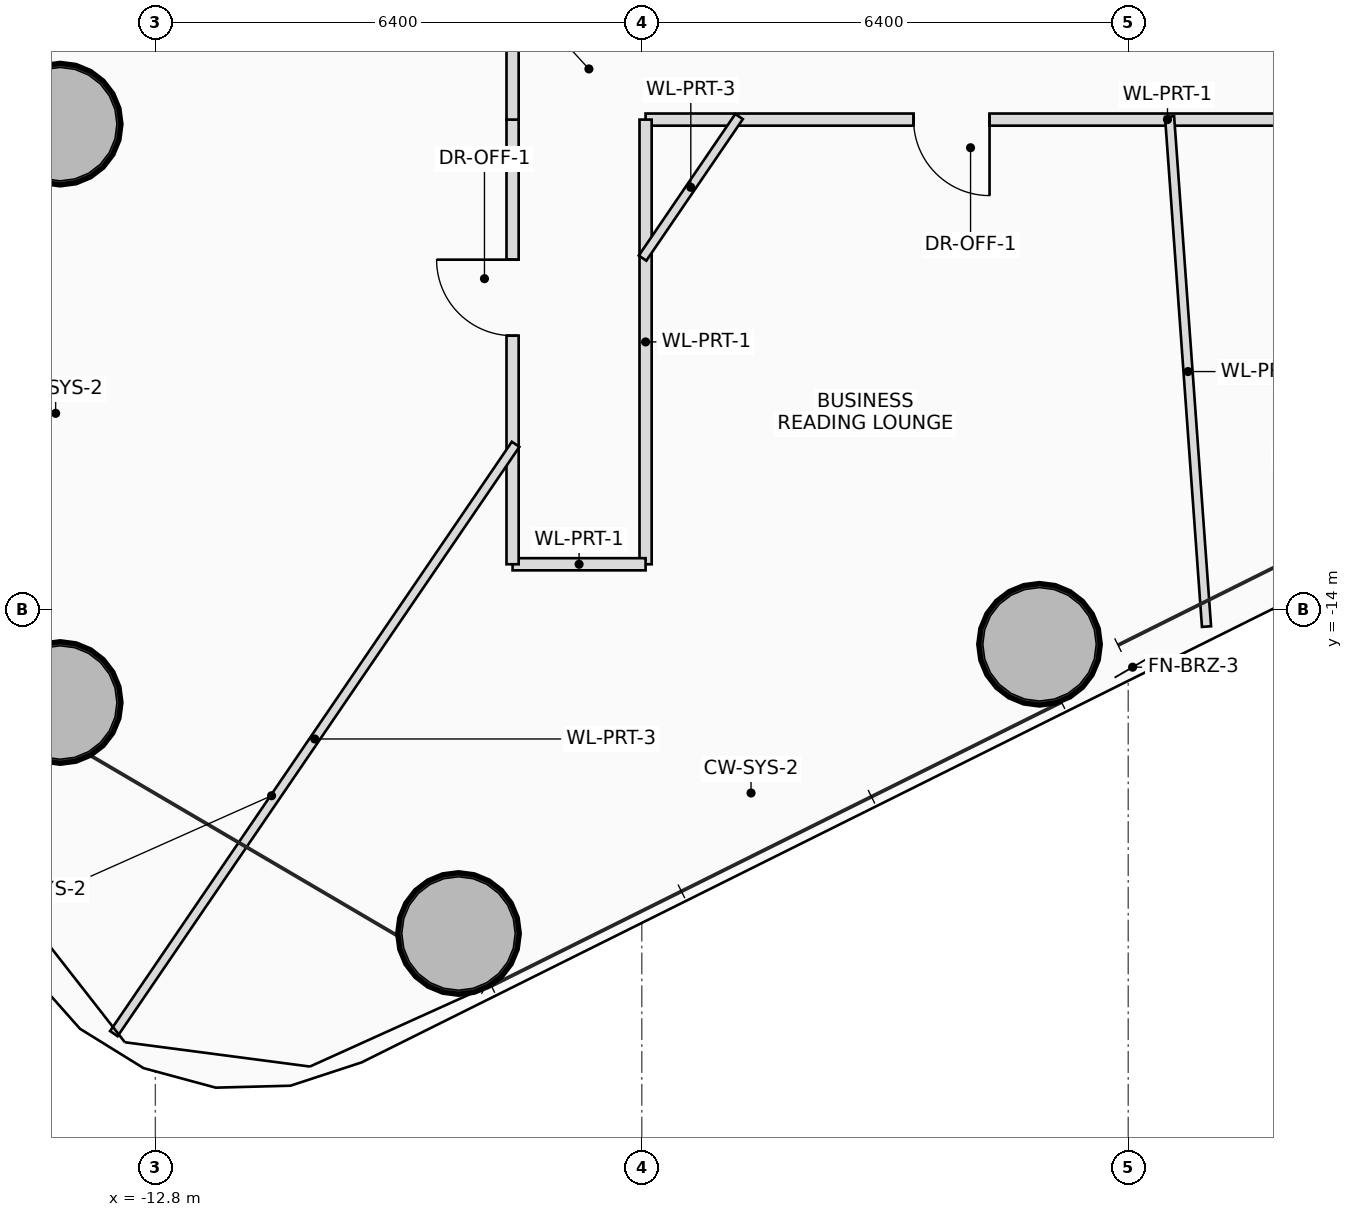
"""IFC4 building model, lengths in metres.
Left out: names, types, materials, properties, quantities, classifications, styles, units other than length and angle.
Written with IfcOpenShell. Run it as: python <this file> out.ifc"""

import sys

from ifc_helpers import new_model, si_unit, direction, frame, frame_2d, origin, origin_2d, place, context, subcontext, project, spatial, rectangle, hollow_circle, extrude, source, transform, mapped, element, fill, save


model = new_model("IFC4")
c1 = context("Model", 3, precision=1e-05, world=origin(), true_north=direction((0.0, 1.0)))
c2 = subcontext(c1, "Body", "Model", "MODEL_VIEW")
j1 = project(units=[si_unit("LENGTHUNIT", "METRE"), si_unit("PLANEANGLEUNIT", "RADIAN")], contexts=[c1])
p1 = place(None, origin())
s1 = spatial("IfcSite", under=j1, at=p1, CompositionType="ELEMENT")
p2 = place(p1, origin())
s2 = spatial("IfcBuilding", under=s1, at=p2, CompositionType="ELEMENT")
p3 = place(p2, frame((0.0, 0.0, 38.6)))
s3 = spatial("IfcBuildingStorey", under=s2, at=p3, CompositionType="ELEMENT", Elevation=38.6)
m1 = source(origin(), c2, "Body", "SweptSolid", [
    extrude(hollow_circle(Radius=0.8, WallThickness=0.055, at=origin_2d()), origin(), (0.0, 0.0, 1.0), 3.7),
])
for number, where, z_axis, x_axis in (
    (1, (-8.812, -18.258, 0.0), (0.0, 0.0, 1.0), (1.0, 0.0, 0.0)),
    (2, (-1.167, -14.453, 0.0), (0.0, 0.0, 1.0), (1.0, 0.0, 0.0)),
    (3, (-14.052, -7.61, 0.0), (0.0, 0.0, 1.0), (1.0, 0.0, 0.0)),
    (4, (-14.052, -15.219, 0.0), (0.0, 0.0, 1.0), (1.0, 0.0, 0.0)),
):
    element("IfcColumn", number, at=place(p3, frame(where, z_axis=z_axis, x_axis=x_axis)), inside=s3, PredefinedType="COLUMN", context=c2, shape_type="MappedRepresentation", body=[
        mapped(m1, transform((0.0, 0.0, 0.0), scale=1.0)),
    ])
p4 = place(p3, frame((6.35, -7.55, 0.0), z_axis=(0.0, 0.0, 1.0), x_axis=(-1.0, 0.0, 0.0)))
e5 = element("IfcWall", 5, at=p4, inside=s3, PredefinedType="PARTITIONING", context=c2, shape_type="SweptSolid", body=[
    extrude(rectangle(XDim=12.7, YDim=0.16, at=frame_2d((6.35, 0.0))), origin(), (0.0, 0.0, 1.0), 2.8),
])
p5 = place(p4, frame((2.493, 0.0, 0.0)))
e6 = element("IfcOpeningElement", 6, at=p5, cuts=e5, PredefinedType="OPENING", context=c2, shape_type="SweptSolid", body=[
    extrude(rectangle(XDim=1.0, YDim=2.25, at=frame_2d((0.5, 1.125))), frame((0.0, 0.09, 0.0), z_axis=(0.0, -1.0, 0.0), x_axis=(1.0, 0.0, 0.0)), (0.0, 0.0, 1.0), 0.18),
])
p6 = place(p4, frame((8.175, 0.0, 0.0)))
e7 = element("IfcOpeningElement", 7, at=p6, cuts=e5, PredefinedType="OPENING", context=c2, shape_type="SweptSolid", body=[
    extrude(rectangle(XDim=1.0, YDim=2.25, at=frame_2d((0.5, 1.125))), frame((0.0, 0.09, 0.0), z_axis=(0.0, -1.0, 0.0), x_axis=(1.0, 0.0, 0.0)), (0.0, 0.0, 1.0), 0.18),
])
p7 = place(p3, frame((-6.35, -7.55, 0.0), z_axis=(0.0, 0.0, 1.0), x_axis=(0.0, -1.0, 0.0)))
e8 = element("IfcWall", 8, at=p7, inside=s3, PredefinedType="PARTITIONING", context=c2, shape_type="SweptSolid", body=[
    extrude(rectangle(XDim=5.85, YDim=0.16, at=frame_2d((2.925, 0.0))), origin(), (0.0, 0.0, 1.0), 2.8),
])
p8 = place(p3, frame((-6.35, -13.4, 0.0), z_axis=(0.0, 0.0, 1.0), x_axis=(-1.0, 0.0, 0.0)))
e9 = element("IfcWall", 9, at=p8, inside=s3, PredefinedType="PARTITIONING", context=c2, shape_type="SweptSolid", body=[
    extrude(rectangle(XDim=1.75, YDim=0.16, at=frame_2d((0.875, 0.0))), origin(), (0.0, 0.0, 1.0), 2.8),
])
p9 = place(p3, frame((-8.1, -13.4, 0.0), z_axis=(0.0, 0.0, 1.0), x_axis=(0.0, 1.0, 0.0)))
e10 = element("IfcWall", 10, at=p9, inside=s3, PredefinedType="PARTITIONING", context=c2, shape_type="SweptSolid", body=[
    extrude(rectangle(XDim=5.85, YDim=0.16, at=frame_2d((2.925, 0.0))), origin(), (0.0, 0.0, 1.0), 2.8),
])
p10 = place(p9, frame((3.007, 0.0, 0.0)))
e11 = element("IfcOpeningElement", 11, at=p10, cuts=e10, PredefinedType="OPENING", context=c2, shape_type="SweptSolid", body=[
    extrude(rectangle(XDim=1.0, YDim=2.25, at=frame_2d((0.5, 1.125))), frame((0.0, 0.09, 0.0), z_axis=(0.0, -1.0, 0.0), x_axis=(1.0, 0.0, 0.0)), (0.0, 0.0, 1.0), 0.18),
])
p11 = place(p3, frame((-8.1, -7.55, 0.0), z_axis=(0.0, 0.0, 1.0), x_axis=(0.0, 1.0, 0.0)))
e12 = element("IfcWall", 12, at=p11, inside=s3, PredefinedType="PARTITIONING", context=c2, shape_type="SweptSolid", body=[
    extrude(rectangle(XDim=15.1, YDim=0.16, at=frame_2d((7.55, 0.0))), origin(), (0.0, 0.0, 1.0), 2.8),
])
p12 = place(p11, frame((11.285, 0.0, 0.0)))
e13 = element("IfcOpeningElement", 13, at=p12, cuts=e12, PredefinedType="OPENING", context=c2, shape_type="SweptSolid", body=[
    extrude(rectangle(XDim=1.0, YDim=2.25, at=frame_2d((0.5, 1.125))), frame((0.0, 0.09, 0.0), z_axis=(0.0, -1.0, 0.0), x_axis=(1.0, 0.0, 0.0)), (0.0, 0.0, 1.0), 0.18),
])
p13 = place(p3, frame((-5.12, -7.51, 0.0), z_axis=(0.0, 0.0, 1.0), x_axis=(-0.563343546536, -0.826222759657, 0.0)))
e14 = element("IfcWall", 14, at=p13, inside=s3, PredefinedType="PARTITIONING", context=c2, shape_type="SweptSolid", body=[
    extrude(rectangle(XDim=2.254, YDim=0.12, at=frame_2d((1.127, 0.0))), origin(), (0.0, 0.0, 1.0), 3.16),
])
p14 = place(p3, frame((-8.06, -11.822, 0.0), z_axis=(0.0, 0.0, 1.0), x_axis=(-0.56331583488, -0.826241653618, 0.0)))
e15 = element("IfcWall", 15, at=p14, inside=s3, PredefinedType="PARTITIONING", context=c2, shape_type="SweptSolid", body=[
    extrude(rectangle(XDim=9.384, YDim=0.12, at=frame_2d((4.692, 0.0))), origin(), (0.0, 0.0, 1.0), 2.96),
])
p15 = place(p3, frame((0.544, -7.51, 0.0), z_axis=(0.0, 0.0, 1.0), x_axis=(0.072255425025, -0.997386160699, 0.0)))
e16 = element("IfcWall", 16, at=p15, inside=s3, PredefinedType="PARTITIONING", context=c2, shape_type="SweptSolid", body=[
    extrude(rectangle(XDim=6.727, YDim=0.12, at=frame_2d((3.364, 0.0))), origin(), (0.0, 0.0, 1.0), 2.96),
])
p16 = place(p6, origin())
e17 = element("IfcDoor", 17, at=p16, inside=s3, OperationType="SINGLE_SWING_LEFT", PredefinedType="DOOR", context=c2, shape_type="SweptSolid", body=[
    extrude(rectangle(XDim=1.0, YDim=2.25, at=frame_2d((0.5, 1.125))), frame((0.0, 0.025, 0.0), z_axis=(0.0, -1.0, 0.0), x_axis=(1.0, 0.0, 0.0)), (0.0, 0.0, 1.0), 0.05),
])
fill(e7, e17)
p17 = place(p10, origin())
e18 = element("IfcDoor", 18, at=p17, inside=s3, OperationType="SINGLE_SWING_RIGHT", PredefinedType="DOOR", context=c2, shape_type="SweptSolid", body=[
    extrude(rectangle(XDim=1.0, YDim=2.25, at=frame_2d((0.5, 1.125))), frame((0.0, 0.025, 0.0), z_axis=(0.0, -1.0, 0.0), x_axis=(1.0, 0.0, 0.0)), (0.0, 0.0, 1.0), 0.05),
])
fill(e11, e18)
save(model, sys.argv[1])
